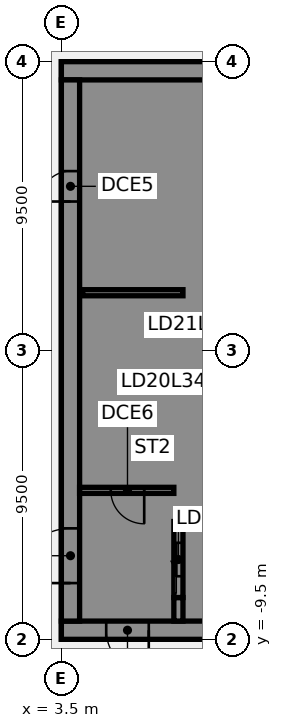
"""IFC4 building model, lengths in metres.
Left out: names, types, materials, properties, quantities, classifications, styles, units other than length and angle.
Written with IfcOpenShell. Run it as: python <this file> out.ifc"""

import sys

from ifc_helpers import new_model, si_unit, direction, frame, frame_2d, origin, place, context, subcontext, project, spatial, polyline, rectangle, outline, extrude, element, fill, save


model = new_model("IFC4")
c1 = context("Model", 3, precision=1e-05, world=origin(), true_north=direction((0.0, 1.0)))
c2 = subcontext(c1, "Body", "Model", "MODEL_VIEW")
j1 = project(units=[si_unit("LENGTHUNIT", "METRE"), si_unit("PLANEANGLEUNIT", "RADIAN")], contexts=[c1])
p1 = place(None, origin())
s1 = spatial("IfcSite", under=j1, at=p1, CompositionType="ELEMENT")
p2 = place(p1, origin())
s2 = spatial("IfcBuilding", under=s1, at=p2, CompositionType="ELEMENT")
p3 = place(p2, frame((0.0, 0.0, 140.5)))
s3 = spatial("IfcBuildingStorey", under=s2, at=p3, CompositionType="ELEMENT", Elevation=140.5)
p4 = place(p3, frame((16.5, -9.2, 0.0), z_axis=(0.0, 0.0, 1.0), x_axis=(-1.0, 0.0, 0.0)))
e1 = element("IfcWall", 1, at=p4, inside=s3, PredefinedType="SHEAR", context=c2, shape_type="SweptSolid", body=[
    extrude(rectangle(XDim=13.0, YDim=0.6, at=frame_2d((6.5, 0.0))), origin(), (0.0, 0.0, 1.0), 3.61),
])
p5 = place(p4, frame((4.15, 0.0, 0.0)))
e2 = element("IfcOpeningElement", 2, at=p5, cuts=e1, PredefinedType="OPENING", context=c2, shape_type="SweptSolid", body=[
    extrude(rectangle(XDim=1.4, YDim=2.1, at=frame_2d((0.7, 1.05))), frame((0.0, 0.31, 0.0), z_axis=(0.0, -1.0, 0.0), x_axis=(1.0, 0.0, 0.0)), (0.0, 0.0, 1.0), 0.62),
])
p6 = place(p4, frame((10.125, 0.0, 0.0)))
e3 = element("IfcOpeningElement", 3, at=p6, cuts=e1, PredefinedType="OPENING", context=c2, shape_type="SweptSolid", body=[
    extrude(rectangle(XDim=1.4, YDim=2.1, at=frame_2d((0.7, 1.05))), frame((0.0, 0.31, 0.0), z_axis=(0.0, -1.0, 0.0), x_axis=(1.0, 0.0, 0.0)), (0.0, 0.0, 1.0), 0.62),
])
p7 = place(p3, frame((16.5, 9.2, 0.0), z_axis=(0.0, 0.0, 1.0), x_axis=(-1.0, 0.0, 0.0)))
e4 = element("IfcWall", 4, at=p7, inside=s3, PredefinedType="SHEAR", context=c2, shape_type="SweptSolid", body=[
    extrude(rectangle(XDim=13.0, YDim=0.6, at=frame_2d((6.5, 0.0))), origin(), (0.0, 0.0, 1.0), 3.61),
])
p8 = place(p3, origin())
e5 = element("IfcWall", 5, at=p8, inside=s3, PredefinedType="SHEAR", context=c2, shape_type="SweptSolid", body=[
    extrude(outline(polyline([(9.8, -5.375), (7.5, -5.375), (7.5, -2.875), (9.8, -2.875), (9.8, -2.625), (7.5, -2.625), (7.5, -0.125), (9.8, -0.125), (9.8, 0.125), (7.5, 0.125), (7.5, 2.625), (9.8, 2.625), (9.8, 2.875), (7.5, 2.875), (7.5, 5.375), (9.8, 5.375), (9.8, 5.625), (7.5, 5.625), (7.5, 8.125), (9.8, 8.125), (9.8, 8.9), (7.5, 8.9), (7.2, 8.9), (7.2, -5.625), (7.5, -5.625), (9.8, -5.625), (9.8, -5.375)])), origin(), (0.0, 0.0, 1.0), 3.61),
])
p9 = place(p3, origin())
e6 = element("IfcWall", 6, at=p9, inside=s3, PredefinedType="SHEAR", context=c2, shape_type="SweptSolid", body=[
    extrude(outline(polyline([(7.5, -8.125), (7.5, -8.9), (9.8, -8.9), (9.8, -8.125), (9.8, -5.625), (9.55, -5.625), (9.55, -8.125), (7.5, -8.125)])), origin(), (0.0, 0.0, 1.0), 3.61),
])
p10 = place(p3, frame((7.35, -8.9, 0.0), z_axis=(0.0, 0.0, 1.0), x_axis=(0.0, 1.0, 0.0)))
e7 = element("IfcWall", 7, at=p10, inside=s3, PredefinedType="SHEAR", context=c2, shape_type="SweptSolid", body=[
    extrude(rectangle(XDim=0.775, YDim=0.3, at=frame_2d((0.387, 0.0))), origin(), (0.0, 0.0, 1.0), 3.61),
])
p11 = place(p3, frame((7.5, 1.9, 0.0), z_axis=(0.0, 0.0, 1.0), x_axis=(-1.0, 0.0, 0.0)))
e8 = element("IfcWall", 8, at=p11, inside=s3, PredefinedType="SHEAR", context=c2, shape_type="SweptSolid", body=[
    extrude(rectangle(XDim=3.3, YDim=0.2, at=frame_2d((1.65, 0.0))), origin(), (0.0, 0.0, 1.0), 3.61),
])
p12 = place(p3, frame((7.35, -8.125, 0.0), z_axis=(0.0, 0.0, 1.0), x_axis=(0.0, 1.0, 0.0)))
e9 = element("IfcWall", 9, at=p12, inside=s3, PredefinedType="SHEAR", context=c2, shape_type="SweptSolid", body=[
    extrude(rectangle(XDim=2.5, YDim=0.3, at=frame_2d((1.25, 0.0))), origin(), (0.0, 0.0, 1.0), 3.61),
])
p13 = place(p12, frame((0.7, 0.0, 0.0)))
e10 = element("IfcOpeningElement", 10, at=p13, cuts=e9, PredefinedType="OPENING", context=c2, shape_type="SweptSolid", body=[
    extrude(rectangle(XDim=1.1, YDim=2.1, at=frame_2d((0.55, 1.05))), frame((0.0, 0.16, 0.0), z_axis=(0.0, -1.0, 0.0), x_axis=(1.0, 0.0, 0.0)), (0.0, 0.0, 1.0), 0.32),
])
p14 = place(p3, frame((3.8, -8.9, 0.0), z_axis=(0.0, 0.0, 1.0), x_axis=(0.0, 1.0, 0.0)))
e11 = element("IfcWall", 11, at=p14, inside=s3, PredefinedType="SHEAR", context=c2, shape_type="SweptSolid", body=[
    extrude(rectangle(XDim=17.8, YDim=0.6, at=frame_2d((8.9, 0.0))), origin(), (0.0, 0.0, 1.0), 3.61),
])
p15 = place(p14, frame((1.25, 0.0, 0.0)))
e12 = element("IfcOpeningElement", 12, at=p15, cuts=e11, PredefinedType="OPENING", context=c2, shape_type="SweptSolid", body=[
    extrude(rectangle(XDim=1.8, YDim=2.1, at=frame_2d((0.9, 1.05))), frame((0.0, 0.31, 0.0), z_axis=(0.0, -1.0, 0.0), x_axis=(1.0, 0.0, 0.0)), (0.0, 0.0, 1.0), 0.62),
])
p16 = place(p14, frame((13.8, 0.0, 0.0)))
e13 = element("IfcOpeningElement", 13, at=p16, cuts=e11, PredefinedType="OPENING", context=c2, shape_type="SweptSolid", body=[
    extrude(rectangle(XDim=1.0, YDim=2.1, at=frame_2d((0.5, 1.05))), frame((0.0, 0.31, 0.0), z_axis=(0.0, -1.0, 0.0), x_axis=(1.0, 0.0, 0.0)), (0.0, 0.0, 1.0), 0.62),
])
p17 = place(p3, frame((7.2, -4.6, 0.0), z_axis=(0.0, 0.0, 1.0), x_axis=(-1.0, 0.0, 0.0)))
e14 = element("IfcWall", 14, at=p17, inside=s3, PredefinedType="SHEAR", context=c2, shape_type="SweptSolid", body=[
    extrude(rectangle(XDim=3.1, YDim=0.2, at=frame_2d((1.55, 0.0))), origin(), (0.0, 0.0, 1.0), 3.61),
])
p18 = place(p17, frame((0.975, 0.0, 0.0)))
e15 = element("IfcOpeningElement", 15, at=p18, cuts=e14, PredefinedType="OPENING", context=c2, shape_type="SweptSolid", body=[
    extrude(rectangle(XDim=1.1, YDim=2.1, at=frame_2d((0.55, 1.05))), frame((0.0, 0.11, 0.0), z_axis=(0.0, -1.0, 0.0), x_axis=(1.0, 0.0, 0.0)), (0.0, 0.0, 1.0), 0.22),
])
p19 = place(p6, origin())
e16 = element("IfcDoor", 16, at=p19, inside=s3, OperationType="SINGLE_SWING_LEFT", PredefinedType="DOOR", context=c2, shape_type="SweptSolid", body=[
    extrude(rectangle(XDim=1.4, YDim=2.1, at=frame_2d((0.7, 1.05))), frame((0.0, 0.025, 0.0), z_axis=(0.0, -1.0, 0.0), x_axis=(1.0, 0.0, 0.0)), (0.0, 0.0, 1.0), 0.05),
])
fill(e3, e16)
p20 = place(p15, origin())
e17 = element("IfcDoor", 17, at=p20, inside=s3, OperationType="SINGLE_SWING_LEFT", PredefinedType="DOOR", context=c2, shape_type="SweptSolid", body=[
    extrude(rectangle(XDim=1.8, YDim=2.1, at=frame_2d((0.9, 1.05))), frame((0.0, 0.025, 0.0), z_axis=(0.0, -1.0, 0.0), x_axis=(1.0, 0.0, 0.0)), (0.0, 0.0, 1.0), 0.05),
])
fill(e12, e17)
p21 = place(p16, origin())
e18 = element("IfcDoor", 18, at=p21, inside=s3, OperationType="SINGLE_SWING_LEFT", PredefinedType="DOOR", context=c2, shape_type="SweptSolid", body=[
    extrude(rectangle(XDim=1.0, YDim=2.1, at=frame_2d((0.5, 1.05))), frame((0.0, 0.025, 0.0), z_axis=(0.0, -1.0, 0.0), x_axis=(1.0, 0.0, 0.0)), (0.0, 0.0, 1.0), 0.05),
])
fill(e13, e18)
p22 = place(p18, origin())
e19 = element("IfcDoor", 19, at=p22, inside=s3, OperationType="SINGLE_SWING_LEFT", PredefinedType="DOOR", context=c2, shape_type="SweptSolid", body=[
    extrude(rectangle(XDim=1.1, YDim=2.1, at=frame_2d((0.55, 1.05))), frame((0.0, 0.025, 0.0), z_axis=(0.0, -1.0, 0.0), x_axis=(1.0, 0.0, 0.0)), (0.0, 0.0, 1.0), 0.05),
])
fill(e15, e19)
p23 = place(p13, origin())
e20 = element("IfcDoor", 20, at=p23, inside=s3, OperationType="SLIDING_TO_LEFT", PredefinedType="DOOR", context=c2, shape_type="SweptSolid", body=[
    extrude(rectangle(XDim=1.1, YDim=2.1, at=frame_2d((0.55, 1.05))), frame((0.0, 0.025, 0.0), z_axis=(0.0, -1.0, 0.0), x_axis=(1.0, 0.0, 0.0)), (0.0, 0.0, 1.0), 0.05),
])
fill(e10, e20)
save(model, sys.argv[1])
